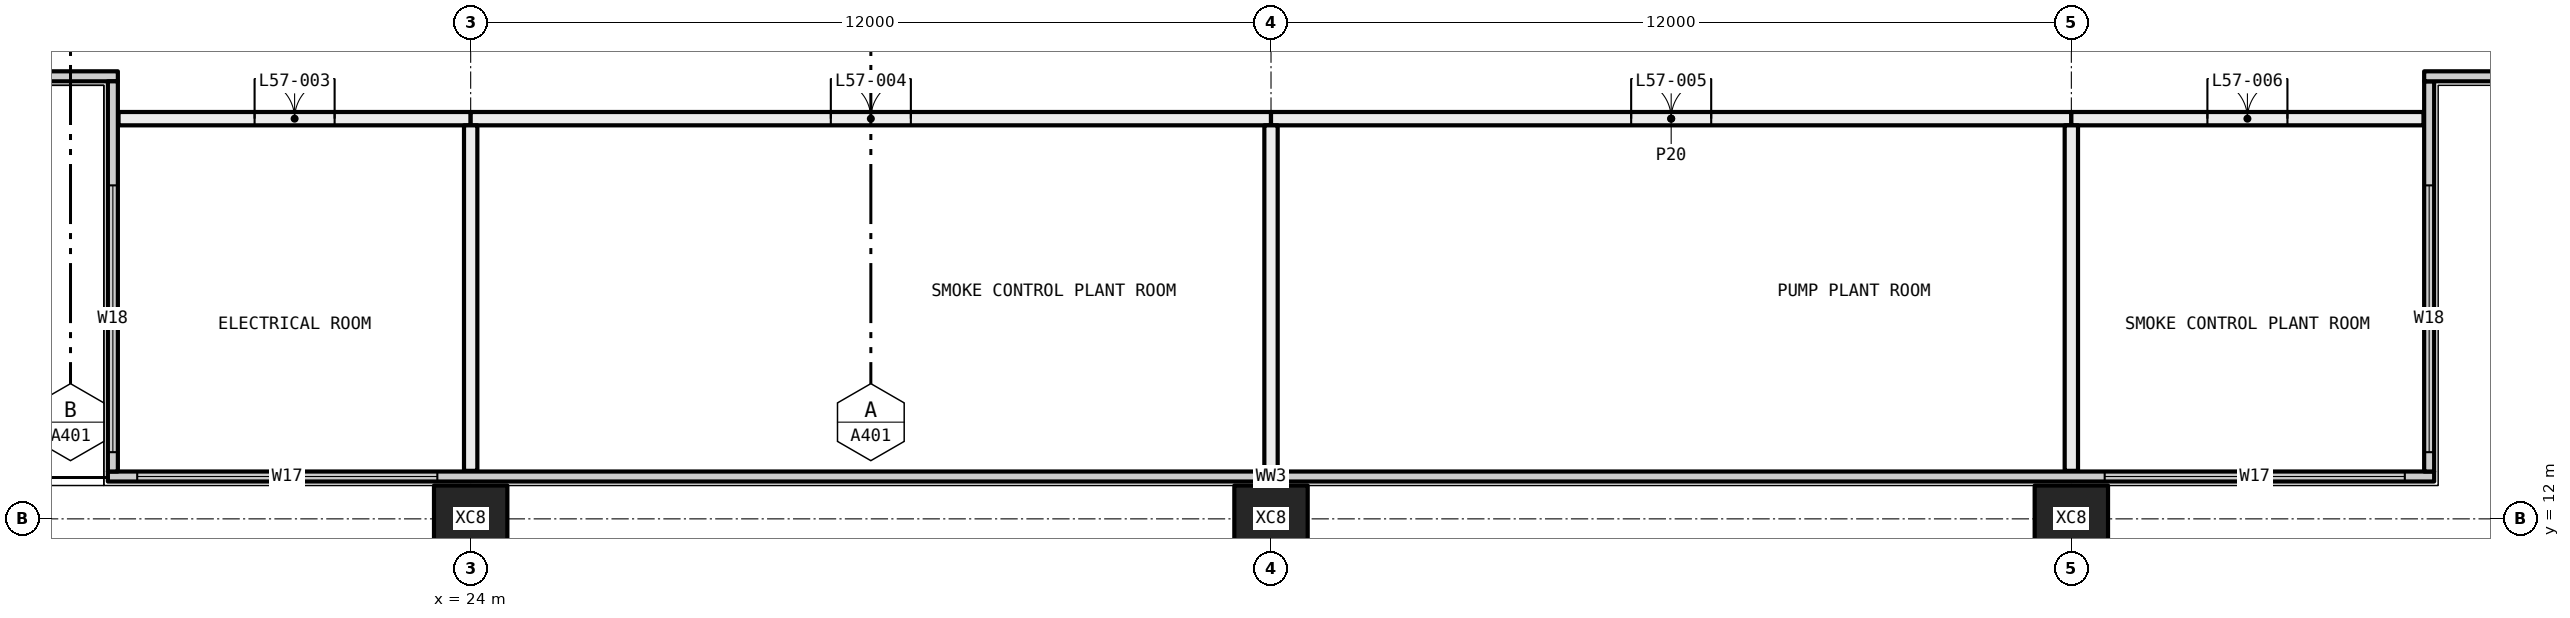
"""IFC4 building model, lengths in metres.
Left out: names, types, materials, properties, quantities, classifications, styles, units other than length and angle.
Written with IfcOpenShell. Run it as: python <this file> out.ifc"""

import sys

from ifc_helpers import new_model, si_unit, direction, frame, frame_2d, origin, origin_2d, place, context, subcontext, project, spatial, rectangle, hollow_rectangle, extrude, element, fill, save


model = new_model("IFC4")
c1 = context("Model", 3, precision=1e-05, world=origin(), true_north=direction((0.0, 1.0)))
c2 = subcontext(c1, "Body", "Model", "MODEL_VIEW")
j1 = project(units=[si_unit("LENGTHUNIT", "METRE"), si_unit("PLANEANGLEUNIT", "RADIAN")], contexts=[c1])
p1 = place(None, origin())
s1 = spatial("IfcSite", under=j1, at=p1, CompositionType="ELEMENT")
p2 = place(p1, origin())
s2 = spatial("IfcBuilding", under=s1, at=p2, CompositionType="ELEMENT")
p3 = place(p2, frame((0.0, 0.0, 213.45)))
s3 = spatial("IfcBuildingStorey", under=s2, at=p3, CompositionType="ELEMENT", Elevation=213.45)
for number, where, z_axis, x_axis in (
    (1, (24.0, 12.0, -0.4), (0.0, 0.0, 1.0), (1.0, 0.0, 0.0)),
    (2, (36.0, 12.0, -0.4), (0.0, 0.0, 1.0), (1.0, 0.0, 0.0)),
    (3, (48.0, 12.0, -0.4), (0.0, 0.0, 1.0), (1.0, 0.0, 0.0)),
):
    element("IfcColumn", number, at=place(p3, frame(where, z_axis=z_axis, x_axis=x_axis)), inside=s3, PredefinedType="COLUMN", context=c2, shape_type="SweptSolid", body=[
        extrude(hollow_rectangle(XDim=1.1, YDim=1.0, WallThickness=0.04, at=origin_2d()), origin(), (0.0, 0.0, 1.0), 4.5),
    ])
p4 = place(p3, frame((18.56, 12.635, 0.0), z_axis=(0.0, 0.0, 1.0), x_axis=(1.0, 0.0, 0.0)))
e4 = element("IfcWall", 4, at=p4, inside=s3, PredefinedType="ELEMENTEDWALL", context=c2, shape_type="SweptSolid", body=[
    extrude(rectangle(XDim=34.88, YDim=0.15, at=frame_2d((17.44, 0.0))), origin(), (0.0, 0.0, 1.0), 4.1),
])
p5 = place(p4, frame((0.44, 0.0, 0.45)))
e5 = element("IfcOpeningElement", 5, at=p5, cuts=e4, PredefinedType="OPENING", context=c2, shape_type="SweptSolid", body=[
    extrude(rectangle(XDim=4.5, YDim=3.6, at=frame_2d((2.25, 1.8))), frame((0.0, 0.085, 0.0), z_axis=(0.0, -1.0, 0.0), x_axis=(1.0, 0.0, 0.0)), (0.0, 0.0, 1.0), 0.17),
])
p6 = place(p4, frame((29.94, 0.0, 0.45)))
e6 = element("IfcOpeningElement", 6, at=p6, cuts=e4, PredefinedType="OPENING", context=c2, shape_type="SweptSolid", body=[
    extrude(rectangle(XDim=4.5, YDim=3.6, at=frame_2d((2.25, 1.8))), frame((0.0, 0.085, 0.0), z_axis=(0.0, -1.0, 0.0), x_axis=(1.0, 0.0, 0.0)), (0.0, 0.0, 1.0), 0.17),
])
p7 = place(p3, frame((53.365, 12.71, 0.0), z_axis=(0.0, 0.0, 1.0), x_axis=(0.0, 1.0, 0.0)))
e7 = element("IfcWall", 7, at=p7, inside=s3, PredefinedType="ELEMENTEDWALL", context=c2, shape_type="SweptSolid", body=[
    extrude(rectangle(XDim=5.85, YDim=0.15, at=frame_2d((2.925, 0.0))), origin(), (0.0, 0.0, 1.0), 4.1),
])
p8 = place(p7, frame((0.29, 0.0, 0.45)))
e8 = element("IfcOpeningElement", 8, at=p8, cuts=e7, PredefinedType="OPENING", context=c2, shape_type="SweptSolid", body=[
    extrude(rectangle(XDim=4.0, YDim=3.6, at=frame_2d((2.0, 1.8))), frame((0.0, 0.085, 0.0), z_axis=(0.0, -1.0, 0.0), x_axis=(1.0, 0.0, 0.0)), (0.0, 0.0, 1.0), 0.17),
])
p9 = place(p3, frame((53.29, 18.635, 0.0), z_axis=(0.0, 0.0, 1.0), x_axis=(1.0, 0.0, 0.0)))
e9 = element("IfcWall", 9, at=p9, inside=s3, PredefinedType="ELEMENTEDWALL", context=c2, shape_type="SweptSolid", body=[
    extrude(rectangle(XDim=6.15, YDim=0.15, at=frame_2d((3.075, 0.0))), origin(), (0.0, 0.0, 1.0), 4.1),
])
p10 = place(p9, frame((1.71, 0.0, 0.45)))
e10 = element("IfcOpeningElement", 10, at=p10, cuts=e9, PredefinedType="OPENING", context=c2, shape_type="SweptSolid", body=[
    extrude(rectangle(XDim=4.0, YDim=3.6, at=frame_2d((2.0, 1.8))), frame((0.0, 0.085, 0.0), z_axis=(0.0, -1.0, 0.0), x_axis=(1.0, 0.0, 0.0)), (0.0, 0.0, 1.0), 0.17),
])
p11 = place(p3, frame((12.56, 18.635, 0.0), z_axis=(0.0, 0.0, 1.0), x_axis=(1.0, 0.0, 0.0)))
e11 = element("IfcWall", 11, at=p11, inside=s3, PredefinedType="ELEMENTEDWALL", context=c2, shape_type="SweptSolid", body=[
    extrude(rectangle(XDim=6.15, YDim=0.15, at=frame_2d((3.075, 0.0))), origin(), (0.0, 0.0, 1.0), 4.1),
])
p12 = place(p11, frame((0.44, 0.0, 0.45)))
e12 = element("IfcOpeningElement", 12, at=p12, cuts=e11, PredefinedType="OPENING", context=c2, shape_type="SweptSolid", body=[
    extrude(rectangle(XDim=0.9, YDim=3.6, at=frame_2d((0.45, 1.8))), frame((0.0, 0.085, 0.0), z_axis=(0.0, -1.0, 0.0), x_axis=(1.0, 0.0, 0.0)), (0.0, 0.0, 1.0), 0.17),
])
p13 = place(p11, frame((3.54, 0.0, 0.45)))
e13 = element("IfcOpeningElement", 13, at=p13, cuts=e11, PredefinedType="OPENING", context=c2, shape_type="SweptSolid", body=[
    extrude(rectangle(XDim=0.9, YDim=3.6, at=frame_2d((0.45, 1.8))), frame((0.0, 0.085, 0.0), z_axis=(0.0, -1.0, 0.0), x_axis=(1.0, 0.0, 0.0)), (0.0, 0.0, 1.0), 0.17),
])
p14 = place(p11, frame((1.54, 0.0, 0.0)))
e14 = element("IfcOpeningElement", 14, at=p14, cuts=e11, PredefinedType="OPENING", context=c2, shape_type="SweptSolid", body=[
    extrude(rectangle(XDim=1.8, YDim=2.4, at=frame_2d((0.9, 1.2))), frame((0.0, 0.085, 0.0), z_axis=(0.0, -1.0, 0.0), x_axis=(1.0, 0.0, 0.0)), (0.0, 0.0, 1.0), 0.17),
])
p15 = place(p3, frame((18.635, 12.71, 0.0), z_axis=(0.0, 0.0, 1.0), x_axis=(0.0, 1.0, 0.0)))
e15 = element("IfcWall", 15, at=p15, inside=s3, PredefinedType="ELEMENTEDWALL", context=c2, shape_type="SweptSolid", body=[
    extrude(rectangle(XDim=5.85, YDim=0.15, at=frame_2d((2.925, 0.0))), origin(), (0.0, 0.0, 1.0), 4.1),
])
p16 = place(p15, frame((0.29, 0.0, 0.45)))
e16 = element("IfcOpeningElement", 16, at=p16, cuts=e15, PredefinedType="OPENING", context=c2, shape_type="SweptSolid", body=[
    extrude(rectangle(XDim=4.0, YDim=3.6, at=frame_2d((2.0, 1.8))), frame((0.0, 0.085, 0.0), z_axis=(0.0, -1.0, 0.0), x_axis=(1.0, 0.0, 0.0)), (0.0, 0.0, 1.0), 0.17),
])
p17 = place(p3, frame((18.72, 18.0, 0.0), z_axis=(0.0, 0.0, 1.0), x_axis=(1.0, 0.0, 0.0)))
e17 = element("IfcWall", 17, at=p17, inside=s3, PredefinedType="PARTITIONING", context=c2, shape_type="SweptSolid", body=[
    extrude(rectangle(XDim=5.28, YDim=0.2, at=frame_2d((2.64, 0.0))), origin(), (0.0, 0.0, 1.0), 4.1),
])
p18 = place(p17, frame((2.04, 0.0, 0.0)))
e18 = element("IfcOpeningElement", 18, at=p18, cuts=e17, PredefinedType="OPENING", context=c2, shape_type="SweptSolid", body=[
    extrude(rectangle(XDim=1.2, YDim=2.1, at=frame_2d((0.6, 1.05))), frame((0.0, 0.11, 0.0), z_axis=(0.0, -1.0, 0.0), x_axis=(1.0, 0.0, 0.0)), (0.0, 0.0, 1.0), 0.22),
])
p19 = place(p3, frame((24.0, 18.0, 0.0), z_axis=(0.0, 0.0, 1.0), x_axis=(1.0, 0.0, 0.0)))
e19 = element("IfcWall", 19, at=p19, inside=s3, PredefinedType="PARTITIONING", context=c2, shape_type="SweptSolid", body=[
    extrude(rectangle(XDim=12.0, YDim=0.2, at=frame_2d((6.0, 0.0))), origin(), (0.0, 0.0, 1.0), 3.5),
])
p20 = place(p19, frame((5.4, 0.0, 0.0)))
e20 = element("IfcOpeningElement", 20, at=p20, cuts=e19, PredefinedType="OPENING", context=c2, shape_type="SweptSolid", body=[
    extrude(rectangle(XDim=1.2, YDim=2.1, at=frame_2d((0.6, 1.05))), frame((0.0, 0.11, 0.0), z_axis=(0.0, -1.0, 0.0), x_axis=(1.0, 0.0, 0.0)), (0.0, 0.0, 1.0), 0.22),
])
p21 = place(p3, frame((36.0, 18.0, 0.0), z_axis=(0.0, 0.0, 1.0), x_axis=(1.0, 0.0, 0.0)))
e21 = element("IfcWall", 21, at=p21, inside=s3, PredefinedType="PARTITIONING", context=c2, shape_type="SweptSolid", body=[
    extrude(rectangle(XDim=12.0, YDim=0.2, at=frame_2d((6.0, 0.0))), origin(), (0.0, 0.0, 1.0), 3.5),
])
p22 = place(p21, frame((5.4, 0.0, 0.0)))
e22 = element("IfcOpeningElement", 22, at=p22, cuts=e21, PredefinedType="OPENING", context=c2, shape_type="SweptSolid", body=[
    extrude(rectangle(XDim=1.2, YDim=2.1, at=frame_2d((0.6, 1.05))), frame((0.0, 0.11, 0.0), z_axis=(0.0, -1.0, 0.0), x_axis=(1.0, 0.0, 0.0)), (0.0, 0.0, 1.0), 0.22),
])
p23 = place(p3, frame((48.0, 18.0, 0.0), z_axis=(0.0, 0.0, 1.0), x_axis=(1.0, 0.0, 0.0)))
e23 = element("IfcWall", 23, at=p23, inside=s3, PredefinedType="PARTITIONING", context=c2, shape_type="SweptSolid", body=[
    extrude(rectangle(XDim=5.28, YDim=0.2, at=frame_2d((2.64, 0.0))), origin(), (0.0, 0.0, 1.0), 4.1),
])
p24 = place(p23, frame((2.04, 0.0, 0.0)))
e24 = element("IfcOpeningElement", 24, at=p24, cuts=e23, PredefinedType="OPENING", context=c2, shape_type="SweptSolid", body=[
    extrude(rectangle(XDim=1.2, YDim=2.1, at=frame_2d((0.6, 1.05))), frame((0.0, 0.11, 0.0), z_axis=(0.0, -1.0, 0.0), x_axis=(1.0, 0.0, 0.0)), (0.0, 0.0, 1.0), 0.22),
])
p25 = place(p3, frame((24.0, 12.72, 0.0), z_axis=(0.0, 0.0, 1.0), x_axis=(0.0, 1.0, 0.0)))
e25 = element("IfcWall", 25, at=p25, inside=s3, PredefinedType="PARTITIONING", context=c2, shape_type="SweptSolid", body=[
    extrude(rectangle(XDim=5.18, YDim=0.2, at=frame_2d((2.59, 0.0))), origin(), (0.0, 0.0, 1.0), 4.1),
])
p26 = place(p3, frame((36.0, 12.72, 0.0), z_axis=(0.0, 0.0, 1.0), x_axis=(0.0, 1.0, 0.0)))
e26 = element("IfcWall", 26, at=p26, inside=s3, PredefinedType="PARTITIONING", context=c2, shape_type="SweptSolid", body=[
    extrude(rectangle(XDim=5.18, YDim=0.2, at=frame_2d((2.59, 0.0))), origin(), (0.0, 0.0, 1.0), 3.5),
])
p27 = place(p3, frame((48.0, 12.72, 0.0), z_axis=(0.0, 0.0, 1.0), x_axis=(0.0, 1.0, 0.0)))
e27 = element("IfcWall", 27, at=p27, inside=s3, PredefinedType="PARTITIONING", context=c2, shape_type="SweptSolid", body=[
    extrude(rectangle(XDim=5.18, YDim=0.2, at=frame_2d((2.59, 0.0))), origin(), (0.0, 0.0, 1.0), 4.1),
])
p28 = place(p5, origin())
e28 = element("IfcWindow", 28, at=p28, inside=s3, PartitioningType="SINGLE_PANEL", PredefinedType="WINDOW", context=c2, shape_type="SweptSolid", body=[
    extrude(rectangle(XDim=4.5, YDim=3.6, at=frame_2d((2.25, 1.8))), frame((0.0, 0.03, 0.0), z_axis=(0.0, -1.0, 0.0), x_axis=(1.0, 0.0, 0.0)), (0.0, 0.0, 1.0), 0.06),
])
fill(e5, e28)
p29 = place(p6, origin())
e29 = element("IfcWindow", 29, at=p29, inside=s3, PartitioningType="SINGLE_PANEL", PredefinedType="WINDOW", context=c2, shape_type="SweptSolid", body=[
    extrude(rectangle(XDim=4.5, YDim=3.6, at=frame_2d((2.25, 1.8))), frame((0.0, 0.03, 0.0), z_axis=(0.0, -1.0, 0.0), x_axis=(1.0, 0.0, 0.0)), (0.0, 0.0, 1.0), 0.06),
])
fill(e6, e29)
p30 = place(p8, origin())
e30 = element("IfcWindow", 30, at=p30, inside=s3, PartitioningType="SINGLE_PANEL", PredefinedType="WINDOW", context=c2, shape_type="SweptSolid", body=[
    extrude(rectangle(XDim=4.0, YDim=3.6, at=frame_2d((2.0, 1.8))), frame((0.0, 0.03, 0.0), z_axis=(0.0, -1.0, 0.0), x_axis=(1.0, 0.0, 0.0)), (0.0, 0.0, 1.0), 0.06),
])
fill(e8, e30)
p31 = place(p16, origin())
e31 = element("IfcWindow", 31, at=p31, inside=s3, PartitioningType="SINGLE_PANEL", PredefinedType="WINDOW", context=c2, shape_type="SweptSolid", body=[
    extrude(rectangle(XDim=4.0, YDim=3.6, at=frame_2d((2.0, 1.8))), frame((0.0, 0.03, 0.0), z_axis=(0.0, -1.0, 0.0), x_axis=(1.0, 0.0, 0.0)), (0.0, 0.0, 1.0), 0.06),
])
fill(e16, e31)
p32 = place(p18, origin())
e32 = element("IfcDoor", 32, at=p32, inside=s3, OperationType="DOUBLE_DOOR_SINGLE_SWING", PredefinedType="DOOR", context=c2, shape_type="SweptSolid", body=[
    extrude(rectangle(XDim=1.2, YDim=2.1, at=frame_2d((0.6, 1.05))), frame((0.0, 0.025, 0.0), z_axis=(0.0, -1.0, 0.0), x_axis=(1.0, 0.0, 0.0)), (0.0, 0.0, 1.0), 0.05),
])
fill(e18, e32)
p33 = place(p20, origin())
e33 = element("IfcDoor", 33, at=p33, inside=s3, OperationType="DOUBLE_DOOR_SINGLE_SWING", PredefinedType="DOOR", context=c2, shape_type="SweptSolid", body=[
    extrude(rectangle(XDim=1.2, YDim=2.1, at=frame_2d((0.6, 1.05))), frame((0.0, 0.025, 0.0), z_axis=(0.0, -1.0, 0.0), x_axis=(1.0, 0.0, 0.0)), (0.0, 0.0, 1.0), 0.05),
])
fill(e20, e33)
p34 = place(p22, origin())
e34 = element("IfcDoor", 34, at=p34, inside=s3, OperationType="DOUBLE_DOOR_SINGLE_SWING", PredefinedType="DOOR", context=c2, shape_type="SweptSolid", body=[
    extrude(rectangle(XDim=1.2, YDim=2.1, at=frame_2d((0.6, 1.05))), frame((0.0, 0.025, 0.0), z_axis=(0.0, -1.0, 0.0), x_axis=(1.0, 0.0, 0.0)), (0.0, 0.0, 1.0), 0.05),
])
fill(e22, e34)
p35 = place(p24, origin())
e35 = element("IfcDoor", 35, at=p35, inside=s3, OperationType="DOUBLE_DOOR_SINGLE_SWING", PredefinedType="DOOR", context=c2, shape_type="SweptSolid", body=[
    extrude(rectangle(XDim=1.2, YDim=2.1, at=frame_2d((0.6, 1.05))), frame((0.0, 0.025, 0.0), z_axis=(0.0, -1.0, 0.0), x_axis=(1.0, 0.0, 0.0)), (0.0, 0.0, 1.0), 0.05),
])
fill(e24, e35)
save(model, sys.argv[1])
